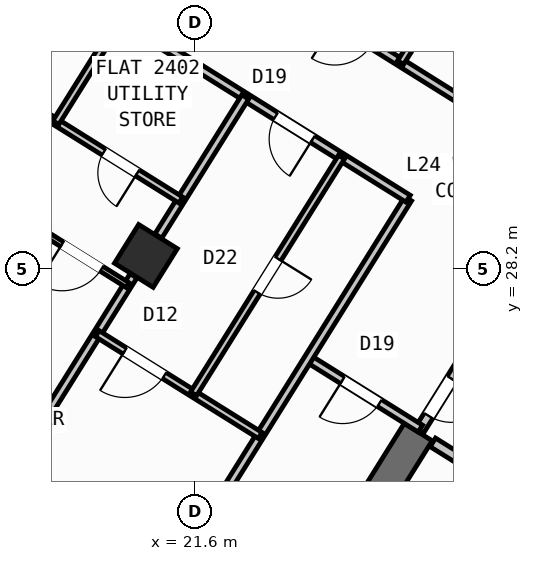
"""IFC4 building model, lengths in metres.
Left out: names, types, materials, properties, quantities, classifications, styles, units other than length and angle.
Written with IfcOpenShell. Run it as: python <this file> out.ifc"""

import sys

from ifc_helpers import new_model, si_unit, direction, frame, frame_2d, origin, origin_2d, place, context, subcontext, project, spatial, rectangle, hollow_rectangle, extrude, source, transform, mapped, element, fill, save


model = new_model("IFC4")
c1 = context("Model", 3, precision=1e-05, world=origin(), true_north=direction((0.0, 1.0)))
c2 = subcontext(c1, "Body", "Model", "MODEL_VIEW")
j1 = project(units=[si_unit("LENGTHUNIT", "METRE"), si_unit("PLANEANGLEUNIT", "RADIAN")], contexts=[c1])
p1 = place(None, origin())
s1 = spatial("IfcSite", under=j1, at=p1, CompositionType="ELEMENT")
p2 = place(p1, origin())
s2 = spatial("IfcBuilding", under=s1, at=p2, CompositionType="ELEMENT")
p3 = place(p2, frame((0.0, 0.0, 97.2)))
s3 = spatial("IfcBuildingStorey", under=s2, at=p3, CompositionType="ELEMENT", Elevation=97.2)
p4 = place(p3, frame((26.007, 24.976, 0.0), z_axis=(0.0, 0.0, 1.0), x_axis=(-0.529916319127, -0.848049936456, 0.0)))
e1 = element("IfcWall", 1, at=p4, inside=s3, PredefinedType="SHEAR", context=c2, shape_type="SweptSolid", body=[
    extrude(rectangle(XDim=6.375, YDim=0.65, at=frame_2d((3.188, 0.0))), origin(), (0.0, 0.0, 1.0), 3.32),
])
m1 = source(origin(), c2, "Body", "SweptSolid", [
    extrude(hollow_rectangle(XDim=0.9, YDim=0.9, WallThickness=0.036, at=origin_2d()), origin(), (0.0, 0.0, 1.0), 3.6),
])
p5 = place(p3, frame((20.632, 28.452, 0.0), z_axis=(0.0, 0.0, 1.0), x_axis=(-0.848048096156, 0.529919264233, 0.0)))
e2 = element("IfcColumn", 2, at=p5, inside=s3, PredefinedType="COLUMN", context=c2, shape_type="MappedRepresentation", body=[
    mapped(m1, transform((0.0, 0.0, 0.0), scale=1.0)),
])
p6 = place(p3, frame((31.76, 12.183, 0.0), z_axis=(0.0, 0.0, 1.0), x_axis=(-0.848047074256, 0.529920899612, 0.0)))
e3 = element("IfcWall", 3, at=p6, inside=s3, PredefinedType="STANDARD", context=c2, shape_type="SweptSolid", body=[
    extrude(rectangle(XDim=30.652, YDim=0.32, at=frame_2d((15.326, 0.0))), origin(), (0.0, 0.0, 1.0), 3.32),
])
p7 = place(p6, frame((15.153, 0.0, 0.0)))
e4 = element("IfcOpeningElement", 4, at=p7, cuts=e3, PredefinedType="OPENING", context=c2, shape_type="SweptSolid", body=[
    extrude(rectangle(XDim=1.2, YDim=2.15, at=frame_2d((0.6, 1.075))), frame((0.0, 0.17, 0.0), z_axis=(0.0, -1.0, 0.0), x_axis=(1.0, 0.0, 0.0)), (0.0, 0.0, 1.0), 0.34),
])
p8 = place(p6, frame((2.002, 0.0, 0.8)))
e5 = element("IfcOpeningElement", 5, at=p8, cuts=e3, PredefinedType="OPENING", context=c2, shape_type="SweptSolid", body=[
    extrude(rectangle(XDim=2.1, YDim=1.55, at=frame_2d((1.05, 0.775))), frame((0.0, 0.17, 0.0), z_axis=(0.0, -1.0, 0.0), x_axis=(1.0, 0.0, 0.0)), (0.0, 0.0, 1.0), 0.34),
])
p9 = place(p6, frame((7.206, 0.0, 0.8)))
e6 = element("IfcOpeningElement", 6, at=p9, cuts=e3, PredefinedType="OPENING", context=c2, shape_type="SweptSolid", body=[
    extrude(rectangle(XDim=2.1, YDim=1.55, at=frame_2d((1.05, 0.775))), frame((0.0, 0.17, 0.0), z_axis=(0.0, -1.0, 0.0), x_axis=(1.0, 0.0, 0.0)), (0.0, 0.0, 1.0), 0.34),
])
p10 = place(p6, frame((12.648, 0.0, 1.0)))
e7 = element("IfcOpeningElement", 7, at=p10, cuts=e3, PredefinedType="OPENING", context=c2, shape_type="SweptSolid", body=[
    extrude(rectangle(XDim=0.9, YDim=1.25, at=frame_2d((0.45, 0.625))), frame((0.0, 0.17, 0.0), z_axis=(0.0, -1.0, 0.0), x_axis=(1.0, 0.0, 0.0)), (0.0, 0.0, 1.0), 0.34),
])
p11 = place(p6, frame((27.974, 0.0, 0.95)))
e8 = element("IfcOpeningElement", 8, at=p11, cuts=e3, PredefinedType="OPENING", context=c2, shape_type="SweptSolid", body=[
    extrude(rectangle(XDim=1.2, YDim=1.4, at=frame_2d((0.6, 0.7))), frame((0.0, 0.17, 0.0), z_axis=(0.0, -1.0, 0.0), x_axis=(1.0, 0.0, 0.0)), (0.0, 0.0, 1.0), 0.34),
])
p12 = place(p6, frame((18.347, 0.0, 1.0)))
e9 = element("IfcOpeningElement", 9, at=p12, cuts=e3, PredefinedType="OPENING", context=c2, shape_type="SweptSolid", body=[
    extrude(rectangle(XDim=0.9, YDim=1.25, at=frame_2d((0.45, 0.625))), frame((0.0, 0.17, 0.0), z_axis=(0.0, -1.0, 0.0), x_axis=(1.0, 0.0, 0.0)), (0.0, 0.0, 1.0), 0.34),
])
p13 = place(p6, frame((20.931, 0.0, 1.0)))
e10 = element("IfcOpeningElement", 10, at=p13, cuts=e3, PredefinedType="OPENING", context=c2, shape_type="SweptSolid", body=[
    extrude(rectangle(XDim=0.65, YDim=1.15, at=frame_2d((0.325, 0.575))), frame((0.0, 0.17, 0.0), z_axis=(0.0, -1.0, 0.0), x_axis=(1.0, 0.0, 0.0)), (0.0, 0.0, 1.0), 0.34),
])
p14 = place(p6, frame((22.938, 0.0, 1.0)))
e11 = element("IfcOpeningElement", 11, at=p14, cuts=e3, PredefinedType="OPENING", context=c2, shape_type="SweptSolid", body=[
    extrude(rectangle(XDim=0.9, YDim=1.25, at=frame_2d((0.45, 0.625))), frame((0.0, 0.17, 0.0), z_axis=(0.0, -1.0, 0.0), x_axis=(1.0, 0.0, 0.0)), (0.0, 0.0, 1.0), 0.34),
])
p15 = place(p6, frame((25.069, 0.0, 1.0)))
e12 = element("IfcOpeningElement", 12, at=p15, cuts=e3, PredefinedType="OPENING", context=c2, shape_type="SweptSolid", body=[
    extrude(rectangle(XDim=0.9, YDim=1.25, at=frame_2d((0.45, 0.625))), frame((0.0, 0.17, 0.0), z_axis=(0.0, -1.0, 0.0), x_axis=(1.0, 0.0, 0.0)), (0.0, 0.0, 1.0), 0.34),
])
p16 = place(p3, frame((17.424, 47.083, 0.0), z_axis=(0.0, 0.0, 1.0), x_axis=(0.848049927979, -0.529916332693, 0.0)))
e13 = element("IfcWall", 13, at=p16, inside=s3, PredefinedType="STANDARD", context=c2, shape_type="SweptSolid", body=[
    extrude(rectangle(XDim=29.223, YDim=0.32, at=frame_2d((14.612, 0.0))), origin(), (0.0, 0.0, 1.0), 3.32),
])
p17 = place(p16, frame((3.745, 0.0, 0.0)))
e14 = element("IfcOpeningElement", 14, at=p17, cuts=e13, PredefinedType="OPENING", context=c2, shape_type="SweptSolid", body=[
    extrude(rectangle(XDim=1.05, YDim=2.15, at=frame_2d((0.525, 1.075))), frame((0.0, 0.17, 0.0), z_axis=(0.0, -1.0, 0.0), x_axis=(1.0, 0.0, 0.0)), (0.0, 0.0, 1.0), 0.34),
])
p18 = place(p16, frame((0.699, 0.0, 0.95)))
e15 = element("IfcOpeningElement", 15, at=p18, cuts=e13, PredefinedType="OPENING", context=c2, shape_type="SweptSolid", body=[
    extrude(rectangle(XDim=1.2, YDim=1.4, at=frame_2d((0.6, 0.7))), frame((0.0, 0.17, 0.0), z_axis=(0.0, -1.0, 0.0), x_axis=(1.0, 0.0, 0.0)), (0.0, 0.0, 1.0), 0.34),
])
p19 = place(p16, frame((6.951, 0.0, 1.0)))
e16 = element("IfcOpeningElement", 16, at=p19, cuts=e13, PredefinedType="OPENING", context=c2, shape_type="SweptSolid", body=[
    extrude(rectangle(XDim=0.9, YDim=1.25, at=frame_2d((0.45, 0.625))), frame((0.0, 0.17, 0.0), z_axis=(0.0, -1.0, 0.0), x_axis=(1.0, 0.0, 0.0)), (0.0, 0.0, 1.0), 0.34),
])
p20 = place(p16, frame((9.841, 0.0, 0.85)))
e17 = element("IfcOpeningElement", 17, at=p20, cuts=e13, PredefinedType="OPENING", context=c2, shape_type="SweptSolid", body=[
    extrude(rectangle(XDim=1.5, YDim=1.5, at=frame_2d((0.75, 0.75))), frame((0.0, 0.17, 0.0), z_axis=(0.0, -1.0, 0.0), x_axis=(1.0, 0.0, 0.0)), (0.0, 0.0, 1.0), 0.34),
])
p21 = place(p16, frame((13.889, 0.0, 0.95)))
e18 = element("IfcOpeningElement", 18, at=p21, cuts=e13, PredefinedType="OPENING", context=c2, shape_type="SweptSolid", body=[
    extrude(rectangle(XDim=1.2, YDim=1.4, at=frame_2d((0.6, 0.7))), frame((0.0, 0.17, 0.0), z_axis=(0.0, -1.0, 0.0), x_axis=(1.0, 0.0, 0.0)), (0.0, 0.0, 1.0), 0.34),
])
p22 = place(p16, frame((17.254, 0.0, 1.0)))
e19 = element("IfcOpeningElement", 19, at=p22, cuts=e13, PredefinedType="OPENING", context=c2, shape_type="SweptSolid", body=[
    extrude(rectangle(XDim=0.9, YDim=1.25, at=frame_2d((0.45, 0.625))), frame((0.0, 0.17, 0.0), z_axis=(0.0, -1.0, 0.0), x_axis=(1.0, 0.0, 0.0)), (0.0, 0.0, 1.0), 0.34),
])
p23 = place(p16, frame((20.764, 0.0, 0.8)))
e20 = element("IfcOpeningElement", 20, at=p23, cuts=e13, PredefinedType="OPENING", context=c2, shape_type="SweptSolid", body=[
    extrude(rectangle(XDim=2.1, YDim=1.55, at=frame_2d((1.05, 0.775))), frame((0.0, 0.17, 0.0), z_axis=(0.0, -1.0, 0.0), x_axis=(1.0, 0.0, 0.0)), (0.0, 0.0, 1.0), 0.34),
])
p24 = place(p16, frame((25.403, 0.0, 0.8)))
e21 = element("IfcOpeningElement", 21, at=p24, cuts=e13, PredefinedType="OPENING", context=c2, shape_type="SweptSolid", body=[
    extrude(rectangle(XDim=2.1, YDim=1.55, at=frame_2d((1.05, 0.775))), frame((0.0, 0.17, 0.0), z_axis=(0.0, -1.0, 0.0), x_axis=(1.0, 0.0, 0.0)), (0.0, 0.0, 1.0), 0.34),
])
p25 = place(p3, frame((31.525, 21.504, 0.0), z_axis=(0.0, 0.0, 1.0), x_axis=(-0.848044998614, 0.529924221305, 0.0)))
e22 = element("IfcWall", 22, at=p25, inside=s3, PredefinedType="STANDARD", context=c2, shape_type="SweptSolid", body=[
    extrude(rectangle(XDim=6.168, YDim=0.2, at=frame_2d((3.084, 0.0))), origin(), (0.0, 0.0, 1.0), 3.31),
])
p26 = place(p25, frame((4.4, 0.0, 0.0)))
e23 = element("IfcOpeningElement", 23, at=p26, cuts=e22, PredefinedType="OPENING", context=c2, shape_type="SweptSolid", body=[
    extrude(rectangle(XDim=0.86, YDim=2.05, at=frame_2d((0.43, 1.025))), frame((0.0, 0.11, 0.0), z_axis=(0.0, -1.0, 0.0), x_axis=(1.0, 0.0, 0.0)), (0.0, 0.0, 1.0), 0.22),
])
p27 = place(p25, frame((0.35, 0.0, 0.0)))
e24 = element("IfcOpeningElement", 24, at=p27, cuts=e22, PredefinedType="OPENING", context=c2, shape_type="SweptSolid", body=[
    extrude(rectangle(XDim=0.86, YDim=2.05, at=frame_2d((0.43, 1.025))), frame((0.0, 0.11, 0.0), z_axis=(0.0, -1.0, 0.0), x_axis=(1.0, 0.0, 0.0)), (0.0, 0.0, 1.0), 0.22),
])
p28 = place(p3, frame((27.596, 27.52, 0.0), z_axis=(0.0, 0.0, 1.0), x_axis=(-0.529865479138, -0.848081702443, 0.0)))
e25 = element("IfcWall", 25, at=p28, inside=s3, PredefinedType="STANDARD", context=c2, shape_type="SweptSolid", body=[
    extrude(rectangle(XDim=2.96, YDim=0.2, at=frame_2d((1.48, 0.0))), origin(), (0.0, 0.0, 1.0), 3.31),
])
p29 = place(p28, frame((1.76, 0.0, 0.0)))
e26 = element("IfcOpeningElement", 26, at=p29, cuts=e25, PredefinedType="OPENING", context=c2, shape_type="SweptSolid", body=[
    extrude(rectangle(XDim=0.86, YDim=2.05, at=frame_2d((0.43, 1.025))), frame((0.0, 0.11, 0.0), z_axis=(0.0, -1.0, 0.0), x_axis=(1.0, 0.0, 0.0)), (0.0, 0.0, 1.0), 0.22),
])
p30 = place(p3, frame((26.049, 25.044, 0.0), z_axis=(0.0, 0.0, 1.0), x_axis=(-0.848050851465, 0.529914854792, 0.0)))
e27 = element("IfcWall", 27, at=p30, inside=s3, PredefinedType="PARTITIONING", context=c2, shape_type="SweptSolid", body=[
    extrude(rectangle(XDim=2.61, YDim=0.16, at=frame_2d((1.305, 0.0))), origin(), (0.0, 0.0, 1.0), 2.745),
])
p31 = place(p30, frame((0.95, 0.0, 0.0)))
e28 = element("IfcOpeningElement", 28, at=p31, cuts=e27, PredefinedType="OPENING", context=c2, shape_type="SweptSolid", body=[
    extrude(rectangle(XDim=0.86, YDim=2.05, at=frame_2d((0.43, 1.025))), frame((0.0, 0.09, 0.0), z_axis=(0.0, -1.0, 0.0), x_axis=(1.0, 0.0, 0.0)), (0.0, 0.0, 1.0), 0.18),
])
p32 = place(p3, frame((25.807, 29.582, 0.0), z_axis=(0.0, 0.0, 1.0), x_axis=(-0.529920357077, -0.848047413271, 0.0)))
e29 = element("IfcWall", 29, at=p32, inside=s3, PredefinedType="PARTITIONING", context=c2, shape_type="SweptSolid", body=[
    extrude(rectangle(XDim=11.45, YDim=0.16, at=frame_2d((5.725, 0.0))), origin(), (0.0, 0.0, 1.0), 3.31),
])
p33 = place(p3, frame((26.973, 31.447, 0.0), z_axis=(0.0, 0.0, 1.0), x_axis=(-0.848048310262, 0.529918921593, 0.0)))
e30 = element("IfcWall", 30, at=p33, inside=s3, PredefinedType="PARTITIONING", context=c2, shape_type="SweptSolid", body=[
    extrude(rectangle(XDim=16.73, YDim=0.16, at=frame_2d((8.365, 0.0))), origin(), (0.0, 0.0, 1.0), 3.31),
])
p34 = place(p33, frame((2.22, 0.0, 0.0)))
e31 = element("IfcOpeningElement", 31, at=p34, cuts=e30, PredefinedType="OPENING", context=c2, shape_type="SweptSolid", body=[
    extrude(rectangle(XDim=0.86, YDim=2.05, at=frame_2d((0.43, 1.025))), frame((0.0, 0.09, 0.0), z_axis=(0.0, -1.0, 0.0), x_axis=(1.0, 0.0, 0.0)), (0.0, 0.0, 1.0), 0.18),
])
p35 = place(p33, frame((5.28, 0.0, 0.0)))
e32 = element("IfcOpeningElement", 32, at=p35, cuts=e30, PredefinedType="OPENING", context=c2, shape_type="SweptSolid", body=[
    extrude(rectangle(XDim=1.0, YDim=2.1, at=frame_2d((0.5, 1.05))), frame((0.0, 0.09, 0.0), z_axis=(0.0, -1.0, 0.0), x_axis=(1.0, 0.0, 0.0)), (0.0, 0.0, 1.0), 0.18),
])
p36 = place(p3, frame((25.807, 29.582, 0.0), z_axis=(0.0, 0.0, 1.0), x_axis=(-0.848052408131, 0.529912363569, 0.0)))
e33 = element("IfcWall", 33, at=p36, inside=s3, PredefinedType="PARTITIONING", context=c2, shape_type="SweptSolid", body=[
    extrude(rectangle(XDim=16.73, YDim=0.16, at=frame_2d((8.365, 0.0))), origin(), (0.0, 0.0, 1.0), 3.31),
])
p37 = place(p36, frame((2.22, 0.0, 0.0)))
e34 = element("IfcOpeningElement", 34, at=p37, cuts=e33, PredefinedType="OPENING", context=c2, shape_type="SweptSolid", body=[
    extrude(rectangle(XDim=0.86, YDim=2.05, at=frame_2d((0.43, 1.025))), frame((0.0, 0.09, 0.0), z_axis=(0.0, -1.0, 0.0), x_axis=(1.0, 0.0, 0.0)), (0.0, 0.0, 1.0), 0.18),
])
p38 = place(p36, frame((14.013, 0.0, 0.0)))
e35 = element("IfcOpeningElement", 35, at=p38, cuts=e33, PredefinedType="OPENING", context=c2, shape_type="SweptSolid", body=[
    extrude(rectangle(XDim=1.0, YDim=2.1, at=frame_2d((0.5, 1.05))), frame((0.0, 0.09, 0.0), z_axis=(0.0, -1.0, 0.0), x_axis=(1.0, 0.0, 0.0)), (0.0, 0.0, 1.0), 0.18),
])
p39 = place(p3, frame((22.593, 31.59, 0.0), z_axis=(0.0, 0.0, 1.0), x_axis=(-0.529924383291, -0.848044897393, 0.0)))
e36 = element("IfcWall", 36, at=p39, inside=s3, PredefinedType="PARTITIONING", context=c2, shape_type="SweptSolid", body=[
    extrude(rectangle(XDim=3.238, YDim=0.16, at=frame_2d((1.619, 0.0))), origin(), (0.0, 0.0, 1.0), 2.745),
])
p40 = place(p3, frame((20.387, 28.06, 0.0), z_axis=(0.0, 0.0, 1.0), x_axis=(-0.529902564924, -0.848058530814, 0.0)))
e37 = element("IfcWall", 37, at=p40, inside=s3, PredefinedType="PARTITIONING", context=c2, shape_type="SweptSolid", body=[
    extrude(rectangle(XDim=6.376, YDim=0.16, at=frame_2d((3.188, 0.0))), origin(), (0.0, 0.0, 1.0), 2.745),
])
p41 = place(p3, frame((22.887, 24.909, 0.0), z_axis=(0.0, 0.0, 1.0), x_axis=(-0.84803087207, 0.529946827537, 0.0)))
e38 = element("IfcWall", 38, at=p41, inside=s3, PredefinedType="PLUMBINGWALL", context=c2, shape_type="SweptSolid", body=[
    extrude(rectangle(XDim=3.79, YDim=0.14, at=frame_2d((1.895, 0.0))), origin(), (0.0, 0.0, 1.0), 3.31),
])
p42 = place(p41, frame((2.23, 0.0, 0.0)))
e39 = element("IfcOpeningElement", 39, at=p42, cuts=e38, PredefinedType="OPENING", context=c2, shape_type="SweptSolid", body=[
    extrude(rectangle(XDim=0.92, YDim=2.08, at=frame_2d((0.46, 1.04))), frame((0.0, 0.08, 0.0), z_axis=(0.0, -1.0, 0.0), x_axis=(1.0, 0.0, 0.0)), (0.0, 0.0, 1.0), 0.16),
])
p43 = place(p3, frame((24.492, 30.403, 0.0), z_axis=(0.0, 0.0, 1.0), x_axis=(-0.529919283494, -0.848048084121, 0.0)))
e40 = element("IfcWall", 40, at=p43, inside=s3, PredefinedType="PLUMBINGWALL", context=c2, shape_type="SweptSolid", body=[
    extrude(rectangle(XDim=5.51, YDim=0.14, at=frame_2d((2.755, 0.0))), origin(), (0.0, 0.0, 1.0), 2.935),
])
p44 = place(p43, frame((2.365, 0.0, 0.0)))
e41 = element("IfcOpeningElement", 41, at=p44, cuts=e40, PredefinedType="OPENING", context=c2, shape_type="SweptSolid", body=[
    extrude(rectangle(XDim=0.78, YDim=2.05, at=frame_2d((0.39, 1.025))), frame((0.0, 0.08, 0.0), z_axis=(0.0, -1.0, 0.0), x_axis=(1.0, 0.0, 0.0)), (0.0, 0.0, 1.0), 0.16),
])
p45 = place(p3, frame((21.321, 29.554, 0.0), z_axis=(0.0, 0.0, 1.0), x_axis=(-0.84803529765, 0.529939745575, 0.0)))
e42 = element("IfcWall", 42, at=p45, inside=s3, PredefinedType="PLUMBINGWALL", context=c2, shape_type="SweptSolid", body=[
    extrude(rectangle(XDim=8.527, YDim=0.14, at=frame_2d((4.264, 0.0))), origin(), (0.0, 0.0, 1.0), 3.31),
])
p46 = place(p45, frame((5.155, 0.0, 0.0)))
e43 = element("IfcOpeningElement", 43, at=p46, cuts=e42, PredefinedType="OPENING", context=c2, shape_type="SweptSolid", body=[
    extrude(rectangle(XDim=0.78, YDim=2.05, at=frame_2d((0.39, 1.025))), frame((0.0, 0.08, 0.0), z_axis=(0.0, -1.0, 0.0), x_axis=(1.0, 0.0, 0.0)), (0.0, 0.0, 1.0), 0.16),
])
p47 = place(p45, frame((1.011, 0.0, 0.0)))
e44 = element("IfcOpeningElement", 44, at=p47, cuts=e42, PredefinedType="OPENING", context=c2, shape_type="SweptSolid", body=[
    extrude(rectangle(XDim=0.78, YDim=2.05, at=frame_2d((0.39, 1.025))), frame((0.0, 0.08, 0.0), z_axis=(0.0, -1.0, 0.0), x_axis=(1.0, 0.0, 0.0)), (0.0, 0.0, 1.0), 0.16),
])
p48 = place(p3, frame((20.132, 33.128, 0.0), z_axis=(0.0, 0.0, 1.0), x_axis=(-0.529935194983, -0.848038141311, 0.0)))
e45 = element("IfcWall", 45, at=p48, inside=s3, PredefinedType="PLUMBINGWALL", context=c2, shape_type="SweptSolid", body=[
    extrude(rectangle(XDim=2.41, YDim=0.14, at=frame_2d((1.205, 0.0))), origin(), (0.0, 0.0, 1.0), 3.31),
])
p49 = place(p3, frame((20.272, 27.875, 0.0), z_axis=(0.0, 0.0, 1.0), x_axis=(-0.848056204746, 0.529906287557, 0.0)))
e46 = element("IfcWall", 46, at=p49, inside=s3, PredefinedType="PARTITIONING", context=c2, shape_type="SweptSolid", body=[
    extrude(rectangle(XDim=8.527, YDim=0.11, at=frame_2d((4.264, 0.0))), origin(), (0.0, 0.0, 1.0), 3.31),
])
p50 = place(p49, frame((0.606, 0.0, 0.0)))
e47 = element("IfcOpeningElement", 47, at=p50, cuts=e46, PredefinedType="OPENING", context=c2, shape_type="SweptSolid", body=[
    extrude(rectangle(XDim=0.92, YDim=2.08, at=frame_2d((0.46, 1.04))), frame((0.0, 0.065, 0.0), z_axis=(0.0, -1.0, 0.0), x_axis=(1.0, 0.0, 0.0)), (0.0, 0.0, 1.0), 0.13),
])
p51 = place(p49, frame((2.738, 0.0, 0.0)))
e48 = element("IfcOpeningElement", 48, at=p51, cuts=e46, PredefinedType="OPENING", context=c2, shape_type="SweptSolid", body=[
    extrude(rectangle(XDim=0.92, YDim=2.08, at=frame_2d((0.46, 1.04))), frame((0.0, 0.065, 0.0), z_axis=(0.0, -1.0, 0.0), x_axis=(1.0, 0.0, 0.0)), (0.0, 0.0, 1.0), 0.13),
])
p52 = place(p49, frame((4.869, 0.0, 0.0)))
e49 = element("IfcOpeningElement", 49, at=p52, cuts=e46, PredefinedType="OPENING", context=c2, shape_type="SweptSolid", body=[
    extrude(rectangle(XDim=0.92, YDim=2.08, at=frame_2d((0.46, 1.04))), frame((0.0, 0.065, 0.0), z_axis=(0.0, -1.0, 0.0), x_axis=(1.0, 0.0, 0.0)), (0.0, 0.0, 1.0), 0.13),
])
p53 = place(p49, frame((7.001, 0.0, 0.0)))
e50 = element("IfcOpeningElement", 50, at=p53, cuts=e46, PredefinedType="OPENING", context=c2, shape_type="SweptSolid", body=[
    extrude(rectangle(XDim=0.92, YDim=2.08, at=frame_2d((0.46, 1.04))), frame((0.0, 0.065, 0.0), z_axis=(0.0, -1.0, 0.0), x_axis=(1.0, 0.0, 0.0)), (0.0, 0.0, 1.0), 0.13),
])
p54 = place(p3, frame((27.518, 35.245, 0.0), z_axis=(0.0, 0.0, 1.0), x_axis=(-0.529948921118, -0.848029563757, 0.0)))
e51 = element("IfcWall", 51, at=p54, inside=s3, PredefinedType="PLUMBINGWALL", context=c2, shape_type="SweptSolid", body=[
    extrude(rectangle(XDim=3.51, YDim=0.14, at=frame_2d((1.755, 0.0))), origin(), (0.0, 0.0, 1.0), 2.935),
])
p55 = place(p54, frame((1.365, 0.0, 0.0)))
e52 = element("IfcOpeningElement", 52, at=p55, cuts=e51, PredefinedType="OPENING", context=c2, shape_type="SweptSolid", body=[
    extrude(rectangle(XDim=0.78, YDim=2.05, at=frame_2d((0.39, 1.025))), frame((0.0, 0.08, 0.0), z_axis=(0.0, -1.0, 0.0), x_axis=(1.0, 0.0, 0.0)), (0.0, 0.0, 1.0), 0.16),
])
m2 = source(origin(), c2, "Body", "SweptSolid", [
    extrude(rectangle(XDim=0.86, YDim=2.05, at=frame_2d((0.43, 1.025))), frame((0.0, 0.025, 0.0), z_axis=(0.0, -1.0, 0.0), x_axis=(1.0, 0.0, 0.0)), (0.0, 0.0, 1.0), 0.05),
])
p56 = place(p31, origin())
e53 = element("IfcDoor", 53, at=p56, inside=s3, OperationType="SINGLE_SWING_RIGHT", PredefinedType="DOOR", context=c2, shape_type="MappedRepresentation", body=[
    mapped(m2, transform((0.0, 0.0, 0.0), scale=1.0)),
])
fill(e28, e53)
p57 = place(p29, origin())
e54 = element("IfcDoor", 54, at=p57, inside=s3, OperationType="SINGLE_SWING_LEFT", PredefinedType="DOOR", context=c2, shape_type="MappedRepresentation", body=[
    mapped(m2, transform((0.0, 0.0, 0.0), scale=1.0)),
])
fill(e26, e54)
p58 = place(p37, origin())
e55 = element("IfcDoor", 55, at=p58, inside=s3, OperationType="SINGLE_SWING_LEFT", PredefinedType="DOOR", context=c2, shape_type="MappedRepresentation", body=[
    mapped(m2, transform((0.0, 0.0, 0.0), scale=1.0)),
])
fill(e34, e55)
m3 = source(origin(), c2, "Body", "SweptSolid", [
    extrude(rectangle(XDim=0.92, YDim=2.08, at=frame_2d((0.46, 1.04))), frame((0.0, 0.025, 0.0), z_axis=(0.0, -1.0, 0.0), x_axis=(1.0, 0.0, 0.0)), (0.0, 0.0, 1.0), 0.05),
])
p59 = place(p42, origin())
e56 = element("IfcDoor", 56, at=p59, inside=s3, OperationType="SINGLE_SWING_RIGHT", PredefinedType="DOOR", context=c2, shape_type="MappedRepresentation", body=[
    mapped(m3, transform((0.0, 0.0, 0.0), scale=1.0)),
])
fill(e39, e56)
m4 = source(origin(), c2, "Body", "SweptSolid", [
    extrude(rectangle(XDim=0.78, YDim=2.05, at=frame_2d((0.39, 1.025))), frame((0.0, 0.025, 0.0), z_axis=(0.0, -1.0, 0.0), x_axis=(1.0, 0.0, 0.0)), (0.0, 0.0, 1.0), 0.05),
])
p60 = place(p44, origin())
e57 = element("IfcDoor", 57, at=p60, inside=s3, OperationType="SINGLE_SWING_LEFT", PredefinedType="DOOR", context=c2, shape_type="MappedRepresentation", body=[
    mapped(m4, transform((0.0, 0.0, 0.0), scale=1.0)),
])
fill(e41, e57)
p61 = place(p47, origin())
e58 = element("IfcDoor", 58, at=p61, inside=s3, OperationType="SINGLE_SWING_LEFT", PredefinedType="DOOR", context=c2, shape_type="MappedRepresentation", body=[
    mapped(m4, transform((0.0, 0.0, 0.0), scale=1.0)),
])
fill(e44, e58)
p62 = place(p50, origin())
e59 = element("IfcDoor", 59, at=p62, inside=s3, OperationType="SINGLE_SWING_RIGHT", PredefinedType="DOOR", context=c2, shape_type="MappedRepresentation", body=[
    mapped(m3, transform((0.0, 0.0, 0.0), scale=1.0)),
])
fill(e47, e59)
save(model, sys.argv[1])
